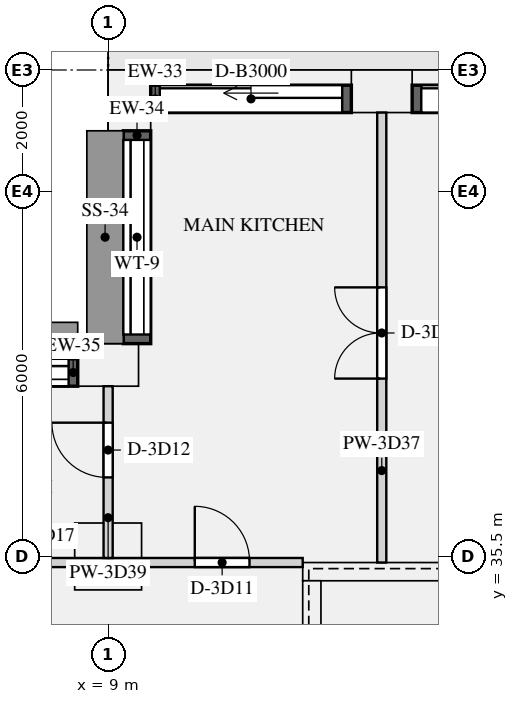
"""IFC4 building model, lengths in metres.
Left out: names, types, materials, properties, quantities, classifications, styles, units other than length and angle.
Written with IfcOpenShell. Run it as: python <this file> out.ifc"""

import sys

from ifc_helpers import new_model, si_unit, direction, frame, frame_2d, origin, origin_2d, place, context, subcontext, project, spatial, rectangle, extrude, element, fill, save


model = new_model("IFC4")
c1 = context("Model", 3, precision=1e-05, world=origin(), true_north=direction((0.0, 1.0)))
c2 = subcontext(c1, "Body", "Model", "MODEL_VIEW")
j1 = project(units=[si_unit("LENGTHUNIT", "METRE"), si_unit("PLANEANGLEUNIT", "RADIAN")], contexts=[c1])
p1 = place(None, origin())
s1 = spatial("IfcSite", under=j1, at=p1, CompositionType="ELEMENT")
p2 = place(p1, origin())
s2 = spatial("IfcBuilding", under=s1, at=p2, CompositionType="ELEMENT")
p3 = place(p2, frame((0.0, 0.0, 166.5)))
s3 = spatial("IfcBuildingStorey", under=s2, at=p3, CompositionType="ELEMENT", Elevation=166.5)
for number, where, z_axis, x_axis in (
    (1, (13.5, 43.15, 0.0), (0.0, 0.0, 1.0), (-1.0, 0.0, 0.0)),
    (2, (9.35, 43.0, 0.0), (0.0, 0.0, 1.0), (0.0, -1.0, 0.0)),
    (3, (9.0, 38.65, 0.0), (0.0, 0.0, 1.0), (-1.0, 0.0, 0.0)),
):
    element("IfcColumn", number, at=place(p3, frame(where, z_axis=z_axis, x_axis=x_axis)), inside=s3, PredefinedType="USERDEFINED", context=c2, shape_type="SweptSolid", body=[
        extrude(rectangle(XDim=1.0, YDim=0.7, at=origin_2d()), origin(), (0.0, 0.0, 1.0), 3.15),
    ])
p4 = place(p3, frame((9.0, 35.5, 0.0), z_axis=(0.0, 0.0, 1.0), x_axis=(1.0, 0.0, 0.0)))
e4 = element("IfcColumn", 4, at=p4, inside=s3, PredefinedType="COLUMN", context=c2, shape_type="SweptSolid", body=[
    extrude(rectangle(XDim=1.1, YDim=1.1, at=origin_2d()), origin(), (0.0, 0.0, 1.0), 3.15),
])
p5 = place(p3, frame((12.2, 35.25, 0.0), z_axis=(0.0, 0.0, 1.0), x_axis=(1.0, 0.0, 0.0)))
e5 = element("IfcWall", 5, at=p5, inside=s3, PredefinedType="SHEAR", context=c2, shape_type="SweptSolid", body=[
    extrude(rectangle(XDim=3.6, YDim=0.3, at=frame_2d((1.8, 0.0))), origin(), (0.0, 0.0, 1.0), 3.15),
])
p6 = place(p3, frame((12.35, 27.3, 0.0), z_axis=(0.0, 0.0, 1.0), x_axis=(0.0, 1.0, 0.0)))
e6 = element("IfcWall", 6, at=p6, inside=s3, PredefinedType="SHEAR", context=c2, shape_type="SweptSolid", body=[
    extrude(rectangle(XDim=7.8, YDim=0.3, at=frame_2d((3.9, 0.0))), origin(), (0.0, 0.0, 1.0), 3.15),
])
p7 = place(p3, frame((17.5, 43.025, 0.0), z_axis=(0.0, 0.0, 1.0), x_axis=(-1.0, 0.0, 0.0)))
e7 = element("IfcWall", 7, at=p7, inside=s3, PredefinedType="SOLIDWALL", context=c2, shape_type="SweptSolid", body=[
    extrude(rectangle(XDim=3.5, YDim=0.45, at=frame_2d((1.75, 0.0))), origin(), (0.0, 0.0, 1.0), 2.83),
])
p8 = place(p7, frame((0.15, 0.0, 0.0)))
e8 = element("IfcOpeningElement", 8, at=p8, cuts=e7, PredefinedType="OPENING", context=c2, shape_type="SweptSolid", body=[
    extrude(rectangle(XDim=3.2, YDim=2.3, at=frame_2d((1.6, 1.15))), frame((0.0, 0.235, 0.0), z_axis=(0.0, -1.0, 0.0), x_axis=(1.0, 0.0, 0.0)), (0.0, 0.0, 1.0), 0.47),
])
p9 = place(p3, frame((13.0, 43.025, 0.0), z_axis=(0.0, 0.0, 1.0), x_axis=(-1.0, 0.0, 0.0)))
e9 = element("IfcWall", 9, at=p9, inside=s3, PredefinedType="SOLIDWALL", context=c2, shape_type="SweptSolid", body=[
    extrude(rectangle(XDim=3.3, YDim=0.45, at=frame_2d((1.65, 0.0))), origin(), (0.0, 0.0, 1.0), 2.83),
])
p10 = place(p9, frame((0.15, 0.0, 0.0)))
e10 = element("IfcOpeningElement", 10, at=p10, cuts=e9, PredefinedType="OPENING", context=c2, shape_type="SweptSolid", body=[
    extrude(rectangle(XDim=3.0, YDim=2.3, at=frame_2d((1.5, 1.15))), frame((0.0, 0.235, 0.0), z_axis=(0.0, -1.0, 0.0), x_axis=(1.0, 0.0, 0.0)), (0.0, 0.0, 1.0), 0.47),
])
p11 = place(p3, frame((9.475, 42.5, 0.9), z_axis=(0.0, 0.0, 1.0), x_axis=(0.0, -1.0, 0.0)))
e11 = element("IfcWall", 11, at=p11, inside=s3, PredefinedType="SOLIDWALL", context=c2, shape_type="SweptSolid", body=[
    extrude(rectangle(XDim=3.5, YDim=0.45, at=frame_2d((1.75, 0.0))), origin(), (0.0, 0.0, 1.0), 1.93),
])
p12 = place(p11, frame((0.15, 0.0, 0.15)))
e12 = element("IfcOpeningElement", 12, at=p12, cuts=e11, PredefinedType="OPENING", context=c2, shape_type="SweptSolid", body=[
    extrude(rectangle(XDim=3.2, YDim=1.5, at=frame_2d((1.6, 0.75))), frame((0.0, 0.235, 0.0), z_axis=(0.0, -1.0, 0.0), x_axis=(1.0, 0.0, 0.0)), (0.0, 0.0, 1.0), 0.47),
])
p13 = place(p3, frame((8.5, 38.525, 0.9), z_axis=(0.0, 0.0, 1.0), x_axis=(-1.0, 0.0, 0.0)))
e13 = element("IfcWall", 13, at=p13, inside=s3, PredefinedType="SOLIDWALL", context=c2, shape_type="SweptSolid", body=[
    extrude(rectangle(XDim=3.3, YDim=0.45, at=frame_2d((1.65, 0.0))), origin(), (0.0, 0.0, 1.0), 1.93),
])
p14 = place(p13, frame((0.15, 0.0, 0.15)))
e14 = element("IfcOpeningElement", 14, at=p14, cuts=e13, PredefinedType="OPENING", context=c2, shape_type="SweptSolid", body=[
    extrude(rectangle(XDim=3.0, YDim=1.5, at=frame_2d((1.5, 0.75))), frame((0.0, 0.235, 0.0), z_axis=(0.0, -1.0, 0.0), x_axis=(1.0, 0.0, 0.0)), (0.0, 0.0, 1.0), 0.47),
])
p15 = place(p3, frame((5.2, 35.4, 0.0), z_axis=(0.0, 0.0, 1.0), x_axis=(1.0, 0.0, 0.0)))
e15 = element("IfcWall", 15, at=p15, inside=s3, PredefinedType="PARTITIONING", context=c2, shape_type="SweptSolid", body=[
    extrude(rectangle(XDim=7.0, YDim=0.15, at=frame_2d((3.5, 0.0))), origin(), (0.0, 0.0, 1.0), 2.83),
])
p16 = place(p15, frame((5.225, 0.0, 0.0)))
e16 = element("IfcOpeningElement", 16, at=p16, cuts=e15, PredefinedType="OPENING", context=c2, shape_type="SweptSolid", body=[
    extrude(rectangle(XDim=0.9, YDim=2.1, at=frame_2d((0.45, 1.05))), frame((0.0, 0.085, 0.0), z_axis=(0.0, -1.0, 0.0), x_axis=(1.0, 0.0, 0.0)), (0.0, 0.0, 1.0), 0.17),
])
p17 = place(p3, frame((13.5, 35.4, 0.0), z_axis=(0.0, 0.0, 1.0), x_axis=(0.0, 1.0, 0.0)))
e17 = element("IfcWall", 17, at=p17, inside=s3, PredefinedType="PARTITIONING", context=c2, shape_type="SweptSolid", body=[
    extrude(rectangle(XDim=7.4, YDim=0.15, at=frame_2d((3.7, 0.0))), origin(), (0.0, 0.0, 1.0), 2.83),
])
p18 = place(p17, frame((3.025, 0.0, 0.0)))
e18 = element("IfcOpeningElement", 18, at=p18, cuts=e17, PredefinedType="OPENING", context=c2, shape_type="SweptSolid", body=[
    extrude(rectangle(XDim=1.5, YDim=2.1, at=frame_2d((0.75, 1.05))), frame((0.0, 0.085, 0.0), z_axis=(0.0, -1.0, 0.0), x_axis=(1.0, 0.0, 0.0)), (0.0, 0.0, 1.0), 0.17),
])
p19 = place(p3, frame((9.0, 35.475, 0.0), z_axis=(0.0, 0.0, 1.0), x_axis=(0.0, 1.0, 0.0)))
e19 = element("IfcWall", 19, at=p19, inside=s3, PredefinedType="PARTITIONING", context=c2, shape_type="SweptSolid", body=[
    extrude(rectangle(XDim=2.825, YDim=0.15, at=frame_2d((1.413, 0.0))), origin(), (0.0, 0.0, 1.0), 2.83),
])
p20 = place(p19, frame((1.325, 0.0, 0.0)))
e20 = element("IfcOpeningElement", 20, at=p20, cuts=e19, PredefinedType="OPENING", context=c2, shape_type="SweptSolid", body=[
    extrude(rectangle(XDim=0.9, YDim=2.1, at=frame_2d((0.45, 1.05))), frame((0.0, 0.085, 0.0), z_axis=(0.0, -1.0, 0.0), x_axis=(1.0, 0.0, 0.0)), (0.0, 0.0, 1.0), 0.17),
])
p21 = place(p8, origin())
e21 = element("IfcDoor", 21, at=p21, inside=s3, OperationType="SLIDING_TO_LEFT", PredefinedType="DOOR", context=c2, shape_type="SweptSolid", body=[
    extrude(rectangle(XDim=3.2, YDim=2.3, at=frame_2d((1.6, 1.15))), frame((0.0, -0.07, 0.0), z_axis=(0.0, -1.0, 0.0), x_axis=(1.0, 0.0, 0.0)), (0.0, 0.0, 1.0), 0.05),
])
fill(e8, e21)
p22 = place(p10, origin())
e22 = element("IfcDoor", 22, at=p22, inside=s3, OperationType="SLIDING_TO_LEFT", PredefinedType="DOOR", context=c2, shape_type="SweptSolid", body=[
    extrude(rectangle(XDim=3.0, YDim=2.3, at=frame_2d((1.5, 1.15))), frame((0.0, -0.07, 0.0), z_axis=(0.0, -1.0, 0.0), x_axis=(1.0, 0.0, 0.0)), (0.0, 0.0, 1.0), 0.05),
])
fill(e10, e22)
p23 = place(p12, origin())
e23 = element("IfcWindow", 23, at=p23, inside=s3, PartitioningType="SINGLE_PANEL", PredefinedType="WINDOW", context=c2, shape_type="SweptSolid", body=[
    extrude(rectangle(XDim=3.2, YDim=1.5, at=frame_2d((1.6, 0.75))), frame((0.0, -0.065, 0.0), z_axis=(0.0, -1.0, 0.0), x_axis=(1.0, 0.0, 0.0)), (0.0, 0.0, 1.0), 0.06),
])
fill(e12, e23)
p24 = place(p14, origin())
e24 = element("IfcWindow", 24, at=p24, inside=s3, PartitioningType="SINGLE_PANEL", PredefinedType="WINDOW", context=c2, shape_type="SweptSolid", body=[
    extrude(rectangle(XDim=3.0, YDim=1.5, at=frame_2d((1.5, 0.75))), frame((0.0, -0.065, 0.0), z_axis=(0.0, -1.0, 0.0), x_axis=(1.0, 0.0, 0.0)), (0.0, 0.0, 1.0), 0.06),
])
fill(e14, e24)
p25 = place(p16, origin())
e25 = element("IfcDoor", 25, at=p25, inside=s3, OperationType="SINGLE_SWING_LEFT", PredefinedType="DOOR", context=c2, shape_type="SweptSolid", body=[
    extrude(rectangle(XDim=0.9, YDim=2.1, at=frame_2d((0.45, 1.05))), frame((0.0, 0.025, 0.0), z_axis=(0.0, -1.0, 0.0), x_axis=(1.0, 0.0, 0.0)), (0.0, 0.0, 1.0), 0.05),
])
fill(e16, e25)
p26 = place(p20, origin())
e26 = element("IfcDoor", 26, at=p26, inside=s3, OperationType="SINGLE_SWING_RIGHT", PredefinedType="DOOR", context=c2, shape_type="SweptSolid", body=[
    extrude(rectangle(XDim=0.9, YDim=2.1, at=frame_2d((0.45, 1.05))), frame((0.0, 0.025, 0.0), z_axis=(0.0, -1.0, 0.0), x_axis=(1.0, 0.0, 0.0)), (0.0, 0.0, 1.0), 0.05),
])
fill(e20, e26)
p27 = place(p18, origin())
e27 = element("IfcDoor", 27, at=p27, inside=s3, OperationType="DOUBLE_DOOR_SINGLE_SWING", PredefinedType="DOOR", context=c2, shape_type="SweptSolid", body=[
    extrude(rectangle(XDim=1.5, YDim=2.1, at=frame_2d((0.75, 1.05))), frame((0.0, 0.025, 0.0), z_axis=(0.0, -1.0, 0.0), x_axis=(1.0, 0.0, 0.0)), (0.0, 0.0, 1.0), 0.05),
])
fill(e18, e27)
save(model, sys.argv[1])
